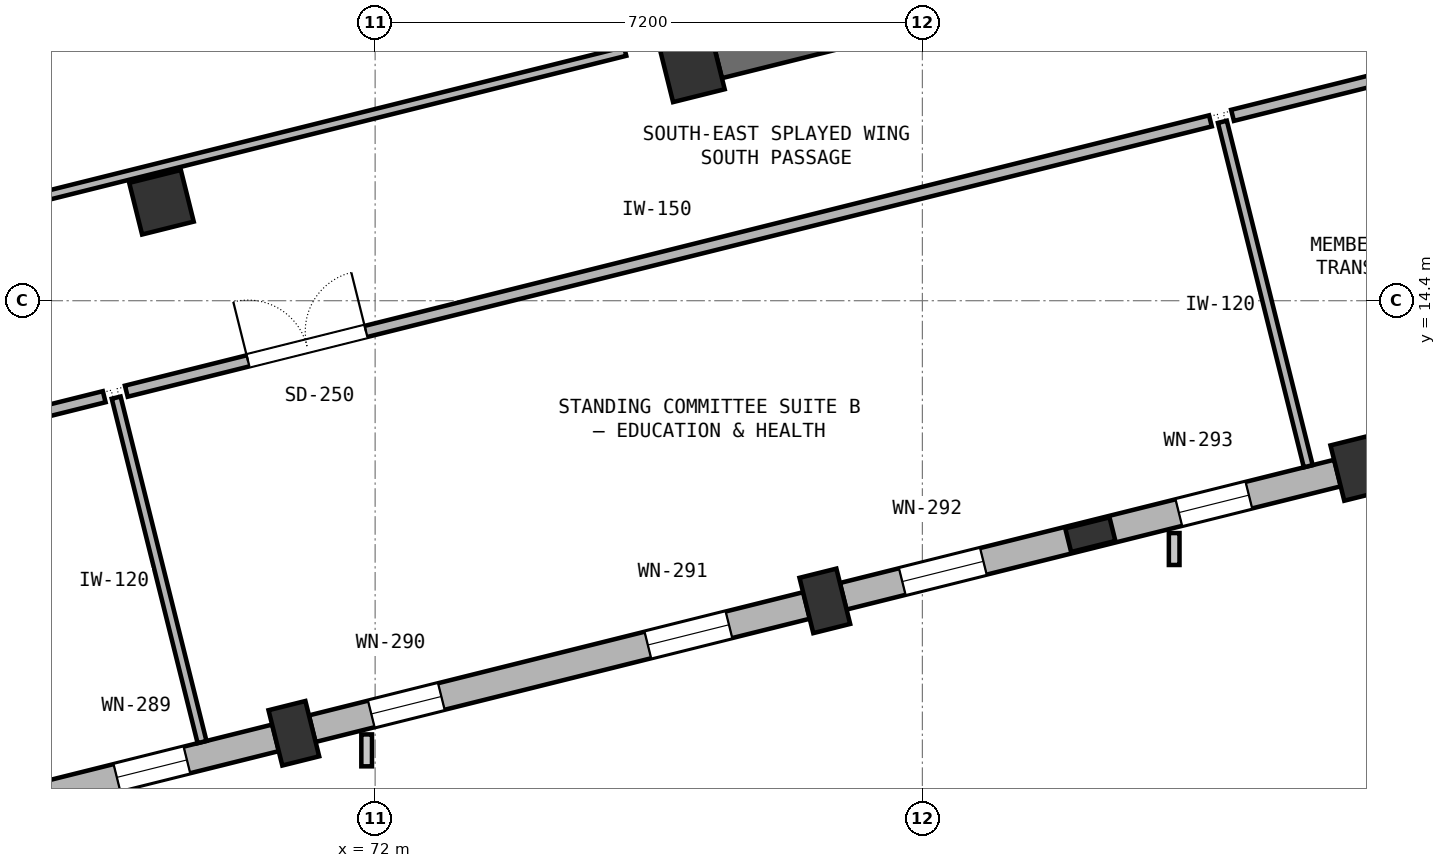
"""IFC4 building model, lengths in metres.
Left out: names, types, materials, properties, quantities, classifications, styles, units other than length and angle.
Written with IfcOpenShell. Run it as: python <this file> out.ifc"""

import sys

from ifc_helpers import new_model, si_unit, direction, frame, frame_2d, origin, origin_2d, place, context, subcontext, project, spatial, rectangle, extrude, element, fill, save


model = new_model("IFC4")
c1 = context("Model", 3, precision=1e-05, world=origin(), true_north=direction((0.0, 1.0)))
c2 = subcontext(c1, "Body", "Model", "MODEL_VIEW")
j1 = project(units=[si_unit("LENGTHUNIT", "METRE"), si_unit("PLANEANGLEUNIT", "RADIAN")], contexts=[c1])
p1 = place(None, origin())
s1 = spatial("IfcSite", under=j1, at=p1, CompositionType="ELEMENT")
p2 = place(p1, origin())
s2 = spatial("IfcBuilding", under=s1, at=p2, CompositionType="ELEMENT")
p3 = place(p2, frame((0.0, 0.0, 10.2)))
s3 = spatial("IfcBuildingStorey", under=s2, at=p3, CompositionType="ELEMENT", Elevation=10.2)
p4 = place(p3, frame((70.931, 8.709, 0.0), z_axis=(0.0, 0.0, 1.0), x_axis=(0.970295726276, 0.2419218956, 0.0)))
e1 = element("IfcColumn", 1, at=p4, inside=s3, PredefinedType="COLUMN", context=c2, shape_type="SweptSolid", body=[
    extrude(rectangle(XDim=0.5, YDim=0.75, at=origin_2d()), origin(), (0.0, 0.0, 1.0), 4.2),
])
p5 = place(p3, frame((69.189, 15.695, 0.0), z_axis=(0.0, 0.0, 1.0), x_axis=(0.970295726276, 0.2419218956, 0.0)))
e2 = element("IfcColumn", 2, at=p5, inside=s3, PredefinedType="COLUMN", context=c2, shape_type="SweptSolid", body=[
    extrude(rectangle(XDim=0.7, YDim=0.7, at=origin_2d()), origin(), (0.0, 0.0, 1.0), 4.2),
])
p6 = place(p3, frame((77.917, 10.451, 0.0), z_axis=(0.0, 0.0, 1.0), x_axis=(0.970295726276, 0.2419218956, 0.0)))
e3 = element("IfcColumn", 3, at=p6, inside=s3, PredefinedType="COLUMN", context=c2, shape_type="SweptSolid", body=[
    extrude(rectangle(XDim=0.5, YDim=0.75, at=origin_2d()), origin(), (0.0, 0.0, 1.0), 4.2),
])
p7 = place(p3, frame((76.175, 17.437, 0.0), z_axis=(0.0, 0.0, 1.0), x_axis=(0.970295726276, 0.2419218956, 0.0)))
e4 = element("IfcColumn", 4, at=p7, inside=s3, PredefinedType="COLUMN", context=c2, shape_type="SweptSolid", body=[
    extrude(rectangle(XDim=0.7, YDim=0.7, at=origin_2d()), origin(), (0.0, 0.0, 1.0), 4.2),
])
p8 = place(p3, frame((84.903, 12.193, 0.0), z_axis=(0.0, 0.0, 1.0), x_axis=(0.970295726276, 0.2419218956, 0.0)))
e5 = element("IfcColumn", 5, at=p8, inside=s3, PredefinedType="COLUMN", context=c2, shape_type="SweptSolid", body=[
    extrude(rectangle(XDim=0.5, YDim=0.75, at=origin_2d()), origin(), (0.0, 0.0, 1.0), 4.2),
])
for number, where, z_axis, x_axis in (
    (6, (67.438, 7.838, 0.0), (0.0, 0.0, 1.0), (0.97, 0.242, 0.0)),
    (7, (81.41, 11.322, 0.0), (0.0, 0.0, 1.0), (0.97, 0.242, 0.0)),
):
    element("IfcColumn", number, at=place(p3, frame(where, z_axis=z_axis, x_axis=x_axis)), inside=s3, PredefinedType="PILASTER", context=c2, shape_type="SweptSolid", body=[
        extrude(rectangle(XDim=0.6, YDim=0.32, at=origin_2d()), origin(), (0.0, 0.0, 1.0), 4.2),
    ])
p9 = place(p3, frame((76.515, 17.522, 0.0), z_axis=(0.0, 0.0, 1.0), x_axis=(0.970294759049, 0.241925774902, 0.0)))
e8 = element("IfcWall", 8, at=p9, inside=s3, PredefinedType="SHEAR", context=c2, shape_type="SweptSolid", body=[
    extrude(rectangle(XDim=6.5, YDim=0.4, at=frame_2d((3.25, 0.0))), origin(), (0.0, 0.0, 1.0), 4.2),
])
p10 = place(p3, frame((64.185, 7.027, 0.0), z_axis=(0.0, 0.0, 1.0), x_axis=(0.970296540998, 0.241918627903, 0.0)))
e9 = element("IfcWall", 9, at=p10, inside=s3, PredefinedType="SOLIDWALL", context=c2, shape_type="SweptSolid", body=[
    extrude(rectangle(XDim=6.704, YDim=0.36, at=frame_2d((3.352, 0.0))), origin(), (0.0, 0.0, 1.0), 3.04),
])
p11 = place(p10, frame((0.802, 0.0, 0.7)))
e10 = element("IfcOpeningElement", 10, at=p11, cuts=e9, PredefinedType="OPENING", context=c2, shape_type="SweptSolid", body=[
    extrude(rectangle(XDim=0.95, YDim=2.19, at=frame_2d((0.475, 1.095))), frame((0.0, 0.19, 0.0), z_axis=(0.0, -1.0, 0.0), x_axis=(1.0, 0.0, 0.0)), (0.0, 0.0, 1.0), 0.38),
])
p12 = place(p10, frame((4.552, 0.0, 0.7)))
e11 = element("IfcOpeningElement", 11, at=p12, cuts=e9, PredefinedType="OPENING", context=c2, shape_type="SweptSolid", body=[
    extrude(rectangle(XDim=0.95, YDim=2.19, at=frame_2d((0.475, 1.095))), frame((0.0, 0.19, 0.0), z_axis=(0.0, -1.0, 0.0), x_axis=(1.0, 0.0, 0.0)), (0.0, 0.0, 1.0), 0.38),
])
p13 = place(p3, frame((71.171, 8.769, 0.0), z_axis=(0.0, 0.0, 1.0), x_axis=(0.97029440959, 0.241927176478, 0.0)))
e12 = element("IfcWall", 12, at=p13, inside=s3, PredefinedType="SOLIDWALL", context=c2, shape_type="SweptSolid", body=[
    extrude(rectangle(XDim=6.704, YDim=0.36, at=frame_2d((3.352, 0.0))), origin(), (0.0, 0.0, 1.0), 3.04),
])
p14 = place(p13, frame((0.802, 0.0, 0.7)))
e13 = element("IfcOpeningElement", 13, at=p14, cuts=e12, PredefinedType="OPENING", context=c2, shape_type="SweptSolid", body=[
    extrude(rectangle(XDim=0.95, YDim=2.19, at=frame_2d((0.475, 1.095))), frame((0.0, 0.19, 0.0), z_axis=(0.0, -1.0, 0.0), x_axis=(1.0, 0.0, 0.0)), (0.0, 0.0, 1.0), 0.38),
])
p15 = place(p13, frame((4.552, 0.0, 0.7)))
e14 = element("IfcOpeningElement", 14, at=p15, cuts=e12, PredefinedType="OPENING", context=c2, shape_type="SweptSolid", body=[
    extrude(rectangle(XDim=1.1, YDim=2.19, at=frame_2d((0.55, 1.095))), frame((0.0, 0.19, 0.0), z_axis=(0.0, -1.0, 0.0), x_axis=(1.0, 0.0, 0.0)), (0.0, 0.0, 1.0), 0.38),
])
p16 = place(p3, frame((78.157, 10.511, 0.0), z_axis=(0.0, 0.0, 1.0), x_axis=(0.970296540998, 0.241918627903, 0.0)))
e15 = element("IfcWall", 15, at=p16, inside=s3, PredefinedType="SOLIDWALL", context=c2, shape_type="SweptSolid", body=[
    extrude(rectangle(XDim=6.704, YDim=0.36, at=frame_2d((3.352, 0.0))), origin(), (0.0, 0.0, 1.0), 3.04),
])
p17 = place(p16, frame((0.802, 0.0, 0.7)))
e16 = element("IfcOpeningElement", 16, at=p17, cuts=e15, PredefinedType="OPENING", context=c2, shape_type="SweptSolid", body=[
    extrude(rectangle(XDim=1.1, YDim=2.19, at=frame_2d((0.55, 1.095))), frame((0.0, 0.19, 0.0), z_axis=(0.0, -1.0, 0.0), x_axis=(1.0, 0.0, 0.0)), (0.0, 0.0, 1.0), 0.38),
])
p18 = place(p16, frame((4.552, 0.0, 0.7)))
e17 = element("IfcOpeningElement", 17, at=p18, cuts=e15, PredefinedType="OPENING", context=c2, shape_type="SweptSolid", body=[
    extrude(rectangle(XDim=0.95, YDim=2.19, at=frame_2d((0.475, 1.095))), frame((0.0, 0.19, 0.0), z_axis=(0.0, -1.0, 0.0), x_axis=(1.0, 0.0, 0.0)), (0.0, 0.0, 1.0), 0.38),
])
p19 = place(p3, frame((50.679, 8.71, 0.0), z_axis=(0.0, 0.0, 1.0), x_axis=(0.97029768554, 0.241914037287, 0.0)))
e18 = element("IfcWall", 18, at=p19, inside=s3, PredefinedType="PARTITIONING", context=c2, shape_type="SweptSolid", body=[
    extrude(rectangle(XDim=18.3, YDim=0.15, at=frame_2d((9.15, 0.0))), origin(), (0.0, 0.0, 1.0), 3.08),
])
p20 = place(p19, frame((8.65, 0.0, 0.0)))
e19 = element("IfcOpeningElement", 19, at=p20, cuts=e18, PredefinedType="OPENING", context=c2, shape_type="SweptSolid", body=[
    extrude(rectangle(XDim=1.0, YDim=2.2, at=frame_2d((0.5, 1.1))), frame((0.0, 0.085, 0.0), z_axis=(0.0, -1.0, 0.0), x_axis=(1.0, 0.0, 0.0)), (0.0, 0.0, 1.0), 0.17),
])
p21 = place(p3, frame((68.726, 13.21, 0.0), z_axis=(0.0, 0.0, 1.0), x_axis=(0.970297636173, 0.241914235293, 0.0)))
e20 = element("IfcWall", 20, at=p21, inside=s3, PredefinedType="PARTITIONING", context=c2, shape_type="SweptSolid", body=[
    extrude(rectangle(XDim=14.7, YDim=0.15, at=frame_2d((7.35, 0.0))), origin(), (0.0, 0.0, 1.0), 3.08),
])
p22 = place(p21, frame((1.65, 0.0, 0.0)))
e21 = element("IfcOpeningElement", 21, at=p22, cuts=e20, PredefinedType="OPENING", context=c2, shape_type="SweptSolid", body=[
    extrude(rectangle(XDim=1.6, YDim=2.2, at=frame_2d((0.8, 1.1))), frame((0.0, 0.085, 0.0), z_axis=(0.0, -1.0, 0.0), x_axis=(1.0, 0.0, 0.0)), (0.0, 0.0, 1.0), 0.17),
])
p23 = place(p3, frame((69.723, 8.594, 0.0), z_axis=(0.0, 0.0, 1.0), x_axis=(-0.241895920765, 0.97030220216, 0.0)))
e22 = element("IfcWall", 22, at=p23, inside=s3, PredefinedType="PARTITIONING", context=c2, shape_type="SweptSolid", body=[
    extrude(rectangle(XDim=4.67, YDim=0.12, at=frame_2d((2.335, 0.0))), origin(), (0.0, 0.0, 1.0), 3.08),
])
p24 = place(p3, frame((83.281, 16.838, 0.0), z_axis=(0.0, 0.0, 1.0), x_axis=(0.970290093403, 0.241944486697, 0.0)))
e23 = element("IfcWall", 23, at=p24, inside=s3, PredefinedType="PARTITIONING", context=c2, shape_type="SweptSolid", body=[
    extrude(rectangle(XDim=6.9, YDim=0.15, at=frame_2d((3.45, 0.0))), origin(), (0.0, 0.0, 1.0), 3.08),
])
p25 = place(p24, frame((2.95, 0.0, 0.0)))
e24 = element("IfcOpeningElement", 24, at=p25, cuts=e23, PredefinedType="OPENING", context=c2, shape_type="SweptSolid", body=[
    extrude(rectangle(XDim=1.0, YDim=2.2, at=frame_2d((0.5, 1.1))), frame((0.0, 0.085, 0.0), z_axis=(0.0, -1.0, 0.0), x_axis=(1.0, 0.0, 0.0)), (0.0, 0.0, 1.0), 0.17),
])
p26 = place(p3, frame((84.277, 12.222, 0.0), z_axis=(0.0, 0.0, 1.0), x_axis=(-0.241895920765, 0.97030220216, 0.0)))
e25 = element("IfcWall", 25, at=p26, inside=s3, PredefinedType="PARTITIONING", context=c2, shape_type="SweptSolid", body=[
    extrude(rectangle(XDim=4.67, YDim=0.12, at=frame_2d((2.335, 0.0))), origin(), (0.0, 0.0, 1.0), 3.08),
])
p27 = place(p3, frame((57.242, 13.18, 0.0), z_axis=(0.0, 0.0, 1.0), x_axis=(0.970295185925, 0.24192406282, 0.0)))
e26 = element("IfcWall", 26, at=p27, inside=s3, PredefinedType="PARTITIONING", context=c2, shape_type="SweptSolid", body=[
    extrude(rectangle(XDim=18.6, YDim=0.12, at=frame_2d((9.3, 0.0))), origin(), (0.0, 0.0, 1.0), 3.08),
])
p28 = place(p12, origin())
e27 = element("IfcWindow", 27, at=p28, inside=s3, PartitioningType="SINGLE_PANEL", PredefinedType="WINDOW", context=c2, shape_type="SweptSolid", body=[
    extrude(rectangle(XDim=0.95, YDim=2.19, at=frame_2d((0.475, 1.095))), frame((0.0, 0.03, 0.0), z_axis=(0.0, -1.0, 0.0), x_axis=(1.0, 0.0, 0.0)), (0.0, 0.0, 1.0), 0.06),
])
fill(e11, e27)
p29 = place(p14, origin())
e28 = element("IfcWindow", 28, at=p29, inside=s3, PartitioningType="SINGLE_PANEL", PredefinedType="WINDOW", context=c2, shape_type="SweptSolid", body=[
    extrude(rectangle(XDim=0.95, YDim=2.19, at=frame_2d((0.475, 1.095))), frame((0.0, 0.03, 0.0), z_axis=(0.0, -1.0, 0.0), x_axis=(1.0, 0.0, 0.0)), (0.0, 0.0, 1.0), 0.06),
])
fill(e13, e28)
p30 = place(p15, origin())
e29 = element("IfcWindow", 29, at=p30, inside=s3, PartitioningType="SINGLE_PANEL", PredefinedType="WINDOW", context=c2, shape_type="SweptSolid", body=[
    extrude(rectangle(XDim=1.1, YDim=2.19, at=frame_2d((0.55, 1.095))), frame((0.0, 0.03, 0.0), z_axis=(0.0, -1.0, 0.0), x_axis=(1.0, 0.0, 0.0)), (0.0, 0.0, 1.0), 0.06),
])
fill(e14, e29)
p31 = place(p17, origin())
e30 = element("IfcWindow", 30, at=p31, inside=s3, PartitioningType="SINGLE_PANEL", PredefinedType="WINDOW", context=c2, shape_type="SweptSolid", body=[
    extrude(rectangle(XDim=1.1, YDim=2.19, at=frame_2d((0.55, 1.095))), frame((0.0, 0.03, 0.0), z_axis=(0.0, -1.0, 0.0), x_axis=(1.0, 0.0, 0.0)), (0.0, 0.0, 1.0), 0.06),
])
fill(e16, e30)
p32 = place(p18, origin())
e31 = element("IfcWindow", 31, at=p32, inside=s3, PartitioningType="SINGLE_PANEL", PredefinedType="WINDOW", context=c2, shape_type="SweptSolid", body=[
    extrude(rectangle(XDim=0.95, YDim=2.19, at=frame_2d((0.475, 1.095))), frame((0.0, 0.03, 0.0), z_axis=(0.0, -1.0, 0.0), x_axis=(1.0, 0.0, 0.0)), (0.0, 0.0, 1.0), 0.06),
])
fill(e17, e31)
p33 = place(p22, origin())
e32 = element("IfcDoor", 32, at=p33, inside=s3, OperationType="DOUBLE_DOOR_SINGLE_SWING", PredefinedType="DOOR", context=c2, shape_type="SweptSolid", body=[
    extrude(rectangle(XDim=1.6, YDim=2.2, at=frame_2d((0.8, 1.1))), frame((0.0, 0.025, 0.0), z_axis=(0.0, -1.0, 0.0), x_axis=(1.0, 0.0, 0.0)), (0.0, 0.0, 1.0), 0.05),
])
fill(e21, e32)
save(model, sys.argv[1])
